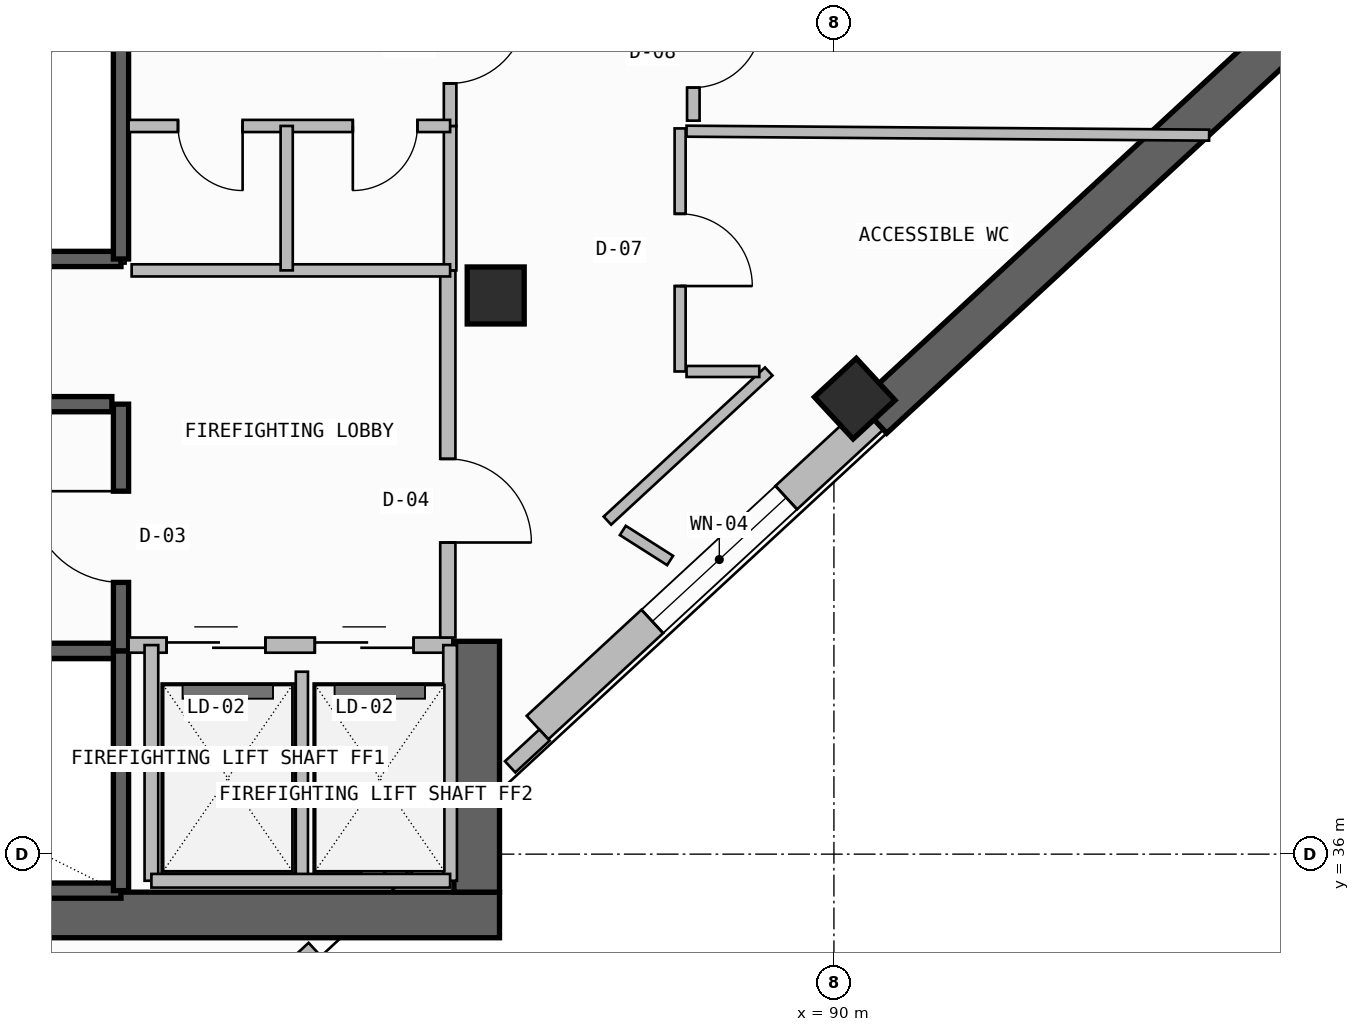
"""IFC4 building model, lengths in metres.
Left out: names, types, materials, properties, quantities, classifications, styles, units other than length and angle.
Written with IfcOpenShell. Run it as: python <this file> out.ifc"""

import sys

from ifc_helpers import new_model, si_unit, direction, frame, frame_2d, origin, origin_2d, place, context, subcontext, project, spatial, rectangle, extrude, element, fill, save


model = new_model("IFC4")
c1 = context("Model", 3, precision=1e-05, world=origin(), true_north=direction((0.0, 1.0)))
c2 = subcontext(c1, "Body", "Model", "MODEL_VIEW")
j1 = project(units=[si_unit("LENGTHUNIT", "METRE"), si_unit("PLANEANGLEUNIT", "RADIAN")], contexts=[c1])
p1 = place(None, origin())
s1 = spatial("IfcSite", under=j1, at=p1, CompositionType="ELEMENT")
p2 = place(p1, origin())
s2 = spatial("IfcBuilding", under=s1, at=p2, CompositionType="ELEMENT")
p3 = place(p2, frame((0.0, 0.0, 271.3)))
s3 = spatial("IfcBuildingStorey", under=s2, at=p3, CompositionType="ELEMENT", Elevation=271.3)
p4 = place(p3, frame((72.3, 35.2, -0.26), z_axis=(0.0, 0.0, 1.0), x_axis=(1.0, 0.0, 0.0)))
e1 = element("IfcWall", 1, at=p4, inside=s3, PredefinedType="SHEAR", context=c2, shape_type="SweptSolid", body=[
    extrude(rectangle(XDim=13.3, YDim=0.6, at=frame_2d((6.65, 0.0))), origin(), (0.0, 0.0, 1.0), 3.52),
])
p5 = place(p3, frame((85.3, 35.5, -0.26), z_axis=(0.0, 0.0, 1.0), x_axis=(0.0, 1.0, 0.0)))
e2 = element("IfcWall", 2, at=p5, inside=s3, PredefinedType="SHEAR", context=c2, shape_type="SweptSolid", body=[
    extrude(rectangle(XDim=3.3, YDim=0.6, at=frame_2d((1.65, 0.0))), origin(), (0.0, 0.0, 1.0), 3.52),
])
for number, where, z_axis, x_axis in (
    (3, (85.55, 43.35, 0.0), (0.0, 0.0, 1.0), (1.0, 0.0, 0.0)),
    (4, (90.273, 41.993, 0.0), (0.0, 0.0, 1.0), (0.734, 0.679, 0.0)),
):
    element("IfcColumn", number, at=place(p3, frame(where, z_axis=z_axis, x_axis=x_axis)), inside=s3, PredefinedType="COLUMN", context=c2, shape_type="SweptSolid", body=[
        extrude(rectangle(XDim=0.75, YDim=0.75, at=origin_2d()), origin(), (0.0, 0.0, 1.0), 3.52),
    ])
p6 = place(p3, frame((86.1, 37.665, 0.0), z_axis=(0.0, 0.0, 1.0), x_axis=(0.734321413343, 0.678801931277, 0.0)))
e5 = element("IfcWall", 5, at=p6, inside=s3, PredefinedType="SOLIDWALL", context=c2, shape_type="SweptSolid", body=[
    extrude(rectangle(XDim=6.002, YDim=0.42, at=frame_2d((3.001, 0.0))), origin(), (0.0, 0.0, 1.0), 2.245),
])
p7 = place(p6, frame((2.057, 0.0, 0.965)))
e6 = element("IfcOpeningElement", 6, at=p7, cuts=e5, PredefinedType="OPENING", context=c2, shape_type="SweptSolid", body=[
    extrude(rectangle(XDim=2.4, YDim=1.2, at=frame_2d((1.2, 0.6))), frame((0.0, 0.22, 0.0), z_axis=(0.0, -1.0, 0.0), x_axis=(1.0, 0.0, 0.0)), (0.0, 0.0, 1.0), 0.44),
])
p8 = place(p3, frame((90.508, 41.74, -0.26), z_axis=(0.0, 0.0, 1.0), x_axis=(0.734315848115, 0.678807951638, 0.0)))
e7 = element("IfcWall", 7, at=p8, inside=s3, PredefinedType="SHEAR", context=c2, shape_type="SweptSolid", body=[
    extrude(rectangle(XDim=16.573, YDim=0.55, at=frame_2d((8.286, 0.0))), origin(), (0.0, 0.0, 1.0), 3.52),
])
p9 = place(p3, frame((86.192, 37.566, 0.0), z_axis=(0.0, 0.0, 1.0), x_axis=(-0.734346728958, -0.678774544064, 0.0)))
e8 = element("IfcWall", 8, at=p9, inside=s3, PredefinedType="PARAPET", context=c2, shape_type="SweptSolid", body=[
    extrude(rectangle(XDim=0.615, YDim=0.2, at=frame_2d((0.308, 0.0))), origin(), (0.0, 0.0, 1.0), 1.15),
])
p10 = place(p3, frame((84.86, 36.335, 0.0), z_axis=(0.0, 0.0, 1.0), x_axis=(-0.734337093013, -0.678784968768, 0.0)))
e9 = element("IfcWall", 9, at=p10, inside=s3, PredefinedType="PARAPET", context=c2, shape_type="SweptSolid", body=[
    extrude(rectangle(XDim=1.024, YDim=0.2, at=frame_2d((0.512, 0.0))), origin(), (0.0, 0.0, 1.0), 1.15),
])
p11 = place(p3, frame((83.156, 34.76, 0.0), z_axis=(0.0, 0.0, 1.0), x_axis=(-0.734364355784, -0.678755473609, 0.0)))
e10 = element("IfcWall", 10, at=p11, inside=s3, PredefinedType="PARAPET", context=c2, shape_type="SweptSolid", body=[
    extrude(rectangle(XDim=1.045, YDim=0.2, at=frame_2d((0.522, 0.0))), origin(), (0.0, 0.0, 1.0), 1.15),
])
for number, where, z_axis, x_axis in (
    (11, (72.92, 35.52, -0.26), (0.0, 0.0, 1.0), (1.0, 0.0, 0.0)),
    (12, (72.92, 38.675, -0.26), (0.0, 0.0, 1.0), (1.0, 0.0, 0.0)),
):
    element("IfcWall", number, at=place(p3, frame(where, z_axis=z_axis, x_axis=x_axis)), inside=s3, PredefinedType="SOLIDWALL", context=c2, shape_type="SweptSolid", body=[
        extrude(rectangle(XDim=7.7, YDim=0.2, at=frame_2d((3.85, 0.0))), origin(), (0.0, 0.0, 1.0), 3.52),
    ])
p12 = place(p3, frame((80.62, 35.52, -0.26), z_axis=(0.0, 0.0, 1.0), x_axis=(0.0, 1.0, 0.0)))
e13 = element("IfcWall", 13, at=p12, inside=s3, PredefinedType="SOLIDWALL", context=c2, shape_type="SweptSolid", body=[
    extrude(rectangle(XDim=3.155, YDim=0.2, at=frame_2d((1.578, 0.0))), origin(), (0.0, 0.0, 1.0), 3.52),
])
p13 = place(p3, frame((80.62, 38.675, -0.26), z_axis=(0.0, 0.0, 1.0), x_axis=(0.0, 1.0, 0.0)))
e14 = element("IfcWall", 14, at=p13, inside=s3, PredefinedType="SOLIDWALL", context=c2, shape_type="SweptSolid", body=[
    extrude(rectangle(XDim=3.245, YDim=0.2, at=frame_2d((1.623, 0.0))), origin(), (0.0, 0.0, 1.0), 3.52),
])
p14 = place(p13, frame((0.9, 0.0, 0.26)))
e15 = element("IfcOpeningElement", 15, at=p14, cuts=e14, PredefinedType="OPENING", context=c2, shape_type="SweptSolid", body=[
    extrude(rectangle(XDim=1.2, YDim=2.2, at=frame_2d((0.6, 1.1))), frame((0.0, 0.11, 0.0), z_axis=(0.0, -1.0, 0.0), x_axis=(1.0, 0.0, 0.0)), (0.0, 0.0, 1.0), 0.22),
])
p15 = place(p3, frame((80.72, 38.75, 0.0), z_axis=(0.0, 0.0, 1.0), x_axis=(1.0, 0.0, 0.0)))
e16 = element("IfcWall", 16, at=p15, inside=s3, PredefinedType="SOLIDWALL", context=c2, shape_type="SweptSolid", body=[
    extrude(rectangle(XDim=4.26, YDim=0.2, at=frame_2d((2.13, 0.0))), origin(), (0.0, 0.0, 1.0), 3.26),
])
p16 = place(p15, frame((0.5, 0.0, 0.0)))
e17 = element("IfcOpeningElement", 17, at=p16, cuts=e16, PredefinedType="OPENING", context=c2, shape_type="SweptSolid", body=[
    extrude(rectangle(XDim=1.3, YDim=2.3, at=frame_2d((0.65, 1.15))), frame((0.0, 0.11, 0.0), z_axis=(0.0, -1.0, 0.0), x_axis=(1.0, 0.0, 0.0)), (0.0, 0.0, 1.0), 0.22),
])
p17 = place(p15, frame((2.45, 0.0, 0.0)))
e18 = element("IfcOpeningElement", 18, at=p17, cuts=e16, PredefinedType="OPENING", context=c2, shape_type="SweptSolid", body=[
    extrude(rectangle(XDim=1.3, YDim=2.3, at=frame_2d((0.65, 1.15))), frame((0.0, 0.11, 0.0), z_axis=(0.0, -1.0, 0.0), x_axis=(1.0, 0.0, 0.0)), (0.0, 0.0, 1.0), 0.22),
])
p18 = place(p3, frame((83.0, 35.65, 0.0), z_axis=(0.0, 0.0, 1.0), x_axis=(0.0, 1.0, 0.0)))
e19 = element("IfcWall", 19, at=p18, inside=s3, PredefinedType="PLUMBINGWALL", context=c2, shape_type="SweptSolid", body=[
    extrude(rectangle(XDim=2.75, YDim=0.16, at=frame_2d((1.375, 0.0))), origin(), (0.0, 0.0, 1.0), 3.26),
])
for number, where, z_axis, x_axis in (
    (20, (84.95, 35.65, 0.0), (0.0, 0.0, 1.0), (0.0, 1.0, 0.0)),
    (21, (81.02, 35.65, 0.0), (0.0, 0.0, 1.0), (0.0, 1.0, 0.0)),
):
    element("IfcWall", number, at=place(p3, frame(where, z_axis=z_axis, x_axis=x_axis)), inside=s3, PredefinedType="SOLIDWALL", context=c2, shape_type="SweptSolid", body=[
        extrude(rectangle(XDim=3.1, YDim=0.18, at=frame_2d((1.55, 0.0))), origin(), (0.0, 0.0, 1.0), 3.26),
    ])
p19 = place(p3, frame((81.02, 35.65, 0.0), z_axis=(0.0, 0.0, 1.0), x_axis=(1.0, 0.0, 0.0)))
e22 = element("IfcWall", 22, at=p19, inside=s3, PredefinedType="SOLIDWALL", context=c2, shape_type="SweptSolid", body=[
    extrude(rectangle(XDim=3.93, YDim=0.18, at=frame_2d((1.965, 0.0))), origin(), (0.0, 0.0, 1.0), 3.26),
])
p20 = place(p3, frame((84.92, 38.85, 0.0), z_axis=(0.0, 0.0, 1.0), x_axis=(0.0, 1.0, 0.0)))
e23 = element("IfcWall", 23, at=p20, inside=s3, PredefinedType="SOLIDWALL", context=c2, shape_type="SweptSolid", body=[
    extrude(rectangle(XDim=4.83, YDim=0.2, at=frame_2d((2.415, 0.0))), origin(), (0.0, 0.0, 1.0), 3.26),
])
p21 = place(p20, frame((1.25, 0.0, 0.0)))
e24 = element("IfcOpeningElement", 24, at=p21, cuts=e23, PredefinedType="OPENING", context=c2, shape_type="SweptSolid", body=[
    extrude(rectangle(XDim=1.1, YDim=2.2, at=frame_2d((0.55, 1.1))), frame((0.0, 0.11, 0.0), z_axis=(0.0, -1.0, 0.0), x_axis=(1.0, 0.0, 0.0)), (0.0, 0.0, 1.0), 0.22),
])
p22 = place(p3, frame((72.92, 41.92, -0.26), z_axis=(0.0, 0.0, 1.0), x_axis=(1.0, 0.0, 0.0)))
e25 = element("IfcWall", 25, at=p22, inside=s3, PredefinedType="SOLIDWALL", context=c2, shape_type="SweptSolid", body=[
    extrude(rectangle(XDim=7.58, YDim=0.2, at=frame_2d((3.79, 0.0))), origin(), (0.0, 0.0, 1.0), 3.52),
])
p23 = place(p3, frame((72.92, 43.83, -0.26), z_axis=(0.0, 0.0, 1.0), x_axis=(1.0, 0.0, 0.0)))
e26 = element("IfcWall", 26, at=p23, inside=s3, PredefinedType="SOLIDWALL", context=c2, shape_type="SweptSolid", body=[
    extrude(rectangle(XDim=7.7, YDim=0.2, at=frame_2d((3.85, 0.0))), origin(), (0.0, 0.0, 1.0), 3.52),
])
p24 = place(p3, frame((80.62, 43.83, -0.26), z_axis=(0.0, 0.0, 1.0), x_axis=(0.0, 1.0, 0.0)))
e27 = element("IfcWall", 27, at=p24, inside=s3, PredefinedType="SOLIDWALL", context=c2, shape_type="SweptSolid", body=[
    extrude(rectangle(XDim=3.24, YDim=0.2, at=frame_2d((1.62, 0.0))), origin(), (0.0, 0.0, 1.0), 3.52),
])
p25 = place(p3, frame((84.95, 43.68, 0.0), z_axis=(0.0, 0.0, 1.0), x_axis=(0.0, 1.0, 0.0)))
e28 = element("IfcWall", 28, at=p25, inside=s3, PredefinedType="PLUMBINGWALL", context=c2, shape_type="SweptSolid", body=[
    extrude(rectangle(XDim=1.9, YDim=0.165, at=frame_2d((0.95, 0.0))), origin(), (0.0, 0.0, 1.0), 3.26),
])
p26 = place(p3, frame((84.95, 45.58, 0.0), z_axis=(0.0, 0.0, 1.0), x_axis=(0.0, 1.0, 0.0)))
e29 = element("IfcWall", 29, at=p26, inside=s3, PredefinedType="PARTITIONING", context=c2, shape_type="SweptSolid", body=[
    extrude(rectangle(XDim=2.12, YDim=0.165, at=frame_2d((1.06, 0.0))), origin(), (0.0, 0.0, 1.0), 3.26),
])
p27 = place(p26, frame((0.56, 0.0, 0.0)))
e30 = element("IfcOpeningElement", 30, at=p27, cuts=e29, PredefinedType="OPENING", context=c2, shape_type="SweptSolid", body=[
    extrude(rectangle(XDim=1.0, YDim=2.2, at=frame_2d((0.5, 1.1))), frame((0.0, 0.093, 0.0), z_axis=(0.0, -1.0, 0.0), x_axis=(1.0, 0.0, 0.0)), (0.0, 0.0, 1.0), 0.185),
])
p28 = place(p3, frame((80.72, 45.58, 0.0), z_axis=(0.0, 0.0, 1.0), x_axis=(1.0, 0.0, 0.0)))
e31 = element("IfcWall", 31, at=p28, inside=s3, PredefinedType="PLUMBINGWALL", context=c2, shape_type="SweptSolid", body=[
    extrude(rectangle(XDim=4.23, YDim=0.16, at=frame_2d((2.115, 0.0))), origin(), (0.0, 0.0, 1.0), 3.26),
])
p29 = place(p28, frame((0.65, 0.0, 0.0)))
e32 = element("IfcOpeningElement", 32, at=p29, cuts=e31, PredefinedType="OPENING", context=c2, shape_type="SweptSolid", body=[
    extrude(rectangle(XDim=0.85, YDim=2.05, at=frame_2d((0.425, 1.025))), frame((0.0, 0.09, 0.0), z_axis=(0.0, -1.0, 0.0), x_axis=(1.0, 0.0, 0.0)), (0.0, 0.0, 1.0), 0.18),
])
p30 = place(p28, frame((2.95, 0.0, 0.0)))
e33 = element("IfcOpeningElement", 33, at=p30, cuts=e31, PredefinedType="OPENING", context=c2, shape_type="SweptSolid", body=[
    extrude(rectangle(XDim=0.85, YDim=2.05, at=frame_2d((0.425, 1.025))), frame((0.0, 0.09, 0.0), z_axis=(0.0, -1.0, 0.0), x_axis=(1.0, 0.0, 0.0)), (0.0, 0.0, 1.0), 0.18),
])
p31 = place(p3, frame((80.76, 43.68, 0.0), z_axis=(0.0, 0.0, 1.0), x_axis=(1.0, 0.0, 0.0)))
e34 = element("IfcWall", 34, at=p31, inside=s3, PredefinedType="PLUMBINGWALL", context=c2, shape_type="SweptSolid", body=[
    extrude(rectangle(XDim=4.19, YDim=0.16, at=frame_2d((2.095, 0.0))), origin(), (0.0, 0.0, 1.0), 3.26),
])
p32 = place(p3, frame((82.8, 43.68, 0.0), z_axis=(0.0, 0.0, 1.0), x_axis=(0.0, 1.0, 0.0)))
e35 = element("IfcWall", 35, at=p32, inside=s3, PredefinedType="PLUMBINGWALL", context=c2, shape_type="SweptSolid", body=[
    extrude(rectangle(XDim=1.9, YDim=0.16, at=frame_2d((0.95, 0.0))), origin(), (0.0, 0.0, 1.0), 3.26),
])
p33 = place(p3, frame((87.976, 42.35, 0.0), z_axis=(0.0, 0.0, 1.0), x_axis=(0.0, 1.0, 0.0)))
e36 = element("IfcWall", 36, at=p33, inside=s3, PredefinedType="PARTITIONING", context=c2, shape_type="SweptSolid", body=[
    extrude(rectangle(XDim=3.198, YDim=0.145, at=frame_2d((1.599, 0.0))), origin(), (0.0, 0.0, 1.0), 2.745),
])
p34 = place(p33, frame((1.124, 0.0, 0.0)))
e37 = element("IfcOpeningElement", 37, at=p34, cuts=e36, PredefinedType="OPENING", context=c2, shape_type="SweptSolid", body=[
    extrude(rectangle(XDim=0.95, YDim=2.15, at=frame_2d((0.475, 1.075))), frame((0.0, 0.083, 0.0), z_axis=(0.0, -1.0, 0.0), x_axis=(1.0, 0.0, 0.0)), (0.0, 0.0, 1.0), 0.165),
])
p35 = place(p3, frame((87.02, 40.388, 0.0), z_axis=(0.0, 0.0, 1.0), x_axis=(0.734304632267, 0.678820084435, 0.0)))
e38 = element("IfcWall", 38, at=p35, inside=s3, PredefinedType="PARTITIONING", context=c2, shape_type="SweptSolid", body=[
    extrude(rectangle(XDim=2.891, YDim=0.145, at=frame_2d((1.445, 0.0))), origin(), (0.0, 0.0, 1.0), 2.745),
])
p36 = place(p3, frame((89.018, 42.35, 0.0), z_axis=(0.0, 0.0, 1.0), x_axis=(-1.0, 0.0, 0.0)))
e39 = element("IfcWall", 39, at=p36, inside=s3, PredefinedType="PARTITIONING", context=c2, shape_type="SweptSolid", body=[
    extrude(rectangle(XDim=0.957, YDim=0.145, at=frame_2d((0.479, 0.0))), origin(), (0.0, 0.0, 1.0), 2.745),
])
p37 = place(p3, frame((88.061, 45.511, 0.0), z_axis=(0.0, 0.0, 1.0), x_axis=(0.999970861304, -0.007633907438, 0.0)))
e40 = element("IfcWall", 40, at=p37, inside=s3, PredefinedType="PARTITIONING", context=c2, shape_type="SweptSolid", body=[
    extrude(rectangle(XDim=6.876, YDim=0.145, at=frame_2d((3.438, 0.0))), origin(), (0.0, 0.0, 1.0), 2.245),
])
p38 = place(p3, frame((88.15, 45.65, 0.0), z_axis=(0.0, 0.0, 1.0), x_axis=(0.0, 1.0, 0.0)))
e41 = element("IfcWall", 41, at=p38, inside=s3, PredefinedType="PARTITIONING", context=c2, shape_type="SweptSolid", body=[
    extrude(rectangle(XDim=1.97, YDim=0.165, at=frame_2d((0.985, 0.0))), origin(), (0.0, 0.0, 1.0), 3.26),
])
p39 = place(p38, frame((0.435, 0.0, 0.0)))
e42 = element("IfcOpeningElement", 42, at=p39, cuts=e41, PredefinedType="OPENING", context=c2, shape_type="SweptSolid", body=[
    extrude(rectangle(XDim=0.9, YDim=2.1, at=frame_2d((0.45, 1.05))), frame((0.0, 0.093, 0.0), z_axis=(0.0, -1.0, 0.0), x_axis=(1.0, 0.0, 0.0)), (0.0, 0.0, 1.0), 0.185),
])
p40 = place(p3, frame((87.844, 39.863, 0.0), z_axis=(0.0, 0.0, 1.0), x_axis=(-0.843784236192, 0.536682553055, 0.0)))
e43 = element("IfcWall", 43, at=p40, inside=s3, PredefinedType="PARTITIONING", context=c2, shape_type="SweptSolid", body=[
    extrude(rectangle(XDim=0.737, YDim=0.145, at=frame_2d((0.369, 0.0))), origin(), (0.0, 0.0, 1.0), 3.26),
])
p41 = place(p7, origin())
e44 = element("IfcWindow", 44, at=p41, inside=s3, PartitioningType="SINGLE_PANEL", PredefinedType="WINDOW", context=c2, shape_type="SweptSolid", body=[
    extrude(rectangle(XDim=2.4, YDim=1.2, at=frame_2d((1.2, 0.6))), frame((0.0, 0.03, 0.0), z_axis=(0.0, -1.0, 0.0), x_axis=(1.0, 0.0, 0.0)), (0.0, 0.0, 1.0), 0.06),
])
fill(e6, e44)
p42 = place(p14, origin())
e45 = element("IfcDoor", 45, at=p42, inside=s3, OperationType="SINGLE_SWING_RIGHT", PredefinedType="USERDEFINED", context=c2, shape_type="SweptSolid", body=[
    extrude(rectangle(XDim=1.2, YDim=2.2, at=frame_2d((0.6, 1.1))), frame((0.0, 0.025, 0.0), z_axis=(0.0, -1.0, 0.0), x_axis=(1.0, 0.0, 0.0)), (0.0, 0.0, 1.0), 0.05),
])
fill(e15, e45)
p43 = place(p16, origin())
e46 = element("IfcDoor", 46, at=p43, inside=s3, OperationType="DOUBLE_DOOR_SLIDING", PredefinedType="DOOR", context=c2, shape_type="SweptSolid", body=[
    extrude(rectangle(XDim=1.3, YDim=2.3, at=frame_2d((0.65, 1.15))), frame((0.0, 0.025, 0.0), z_axis=(0.0, -1.0, 0.0), x_axis=(1.0, 0.0, 0.0)), (0.0, 0.0, 1.0), 0.05),
])
fill(e17, e46)
p44 = place(p17, origin())
e47 = element("IfcDoor", 47, at=p44, inside=s3, OperationType="DOUBLE_DOOR_SLIDING", PredefinedType="DOOR", context=c2, shape_type="SweptSolid", body=[
    extrude(rectangle(XDim=1.3, YDim=2.3, at=frame_2d((0.65, 1.15))), frame((0.0, 0.025, 0.0), z_axis=(0.0, -1.0, 0.0), x_axis=(1.0, 0.0, 0.0)), (0.0, 0.0, 1.0), 0.05),
])
fill(e18, e47)
p45 = place(p21, frame((1.1, 0.0, 0.0), z_axis=(0.0, 0.0, 1.0), x_axis=(-1.0, 0.0, 0.0)))
e48 = element("IfcDoor", 48, at=p45, inside=s3, OperationType="SINGLE_SWING_RIGHT", PredefinedType="DOOR", context=c2, shape_type="SweptSolid", body=[
    extrude(rectangle(XDim=1.1, YDim=2.2, at=frame_2d((0.55, 1.1))), frame((0.0, 0.025, 0.0), z_axis=(0.0, -1.0, 0.0), x_axis=(1.0, 0.0, 0.0)), (0.0, 0.0, 1.0), 0.05),
])
fill(e24, e48)
p46 = place(p27, frame((1.0, 0.0, 0.0), z_axis=(0.0, 0.0, 1.0), x_axis=(-1.0, 0.0, 0.0)))
e49 = element("IfcDoor", 49, at=p46, inside=s3, OperationType="SINGLE_SWING_LEFT", PredefinedType="DOOR", context=c2, shape_type="SweptSolid", body=[
    extrude(rectangle(XDim=1.0, YDim=2.2, at=frame_2d((0.5, 1.1))), frame((0.0, 0.025, 0.0), z_axis=(0.0, -1.0, 0.0), x_axis=(1.0, 0.0, 0.0)), (0.0, 0.0, 1.0), 0.05),
])
fill(e30, e49)
p47 = place(p29, frame((0.85, 0.0, 0.0), z_axis=(0.0, 0.0, 1.0), x_axis=(-1.0, 0.0, 0.0)))
e50 = element("IfcDoor", 50, at=p47, inside=s3, OperationType="SINGLE_SWING_LEFT", PredefinedType="DOOR", context=c2, shape_type="SweptSolid", body=[
    extrude(rectangle(XDim=0.85, YDim=2.05, at=frame_2d((0.425, 1.025))), frame((0.0, 0.025, 0.0), z_axis=(0.0, -1.0, 0.0), x_axis=(1.0, 0.0, 0.0)), (0.0, 0.0, 1.0), 0.05),
])
fill(e32, e50)
p48 = place(p30, frame((0.85, 0.0, 0.0), z_axis=(0.0, 0.0, 1.0), x_axis=(-1.0, 0.0, 0.0)))
e51 = element("IfcDoor", 51, at=p48, inside=s3, OperationType="SINGLE_SWING_RIGHT", PredefinedType="DOOR", context=c2, shape_type="SweptSolid", body=[
    extrude(rectangle(XDim=0.85, YDim=2.05, at=frame_2d((0.425, 1.025))), frame((0.0, 0.025, 0.0), z_axis=(0.0, -1.0, 0.0), x_axis=(1.0, 0.0, 0.0)), (0.0, 0.0, 1.0), 0.05),
])
fill(e33, e51)
p49 = place(p34, frame((0.95, 0.0, 0.0), z_axis=(0.0, 0.0, 1.0), x_axis=(-1.0, 0.0, 0.0)))
e52 = element("IfcDoor", 52, at=p49, inside=s3, OperationType="SINGLE_SWING_RIGHT", PredefinedType="DOOR", context=c2, shape_type="SweptSolid", body=[
    extrude(rectangle(XDim=0.95, YDim=2.15, at=frame_2d((0.475, 1.075))), frame((0.0, 0.025, 0.0), z_axis=(0.0, -1.0, 0.0), x_axis=(1.0, 0.0, 0.0)), (0.0, 0.0, 1.0), 0.05),
])
fill(e37, e52)
p50 = place(p39, frame((0.9, 0.0, 0.0), z_axis=(0.0, 0.0, 1.0), x_axis=(-1.0, 0.0, 0.0)))
e53 = element("IfcDoor", 53, at=p50, inside=s3, OperationType="SINGLE_SWING_LEFT", PredefinedType="DOOR", context=c2, shape_type="SweptSolid", body=[
    extrude(rectangle(XDim=0.9, YDim=2.1, at=frame_2d((0.45, 1.05))), frame((0.0, 0.025, 0.0), z_axis=(0.0, -1.0, 0.0), x_axis=(1.0, 0.0, 0.0)), (0.0, 0.0, 1.0), 0.05),
])
fill(e42, e53)
save(model, sys.argv[1])
